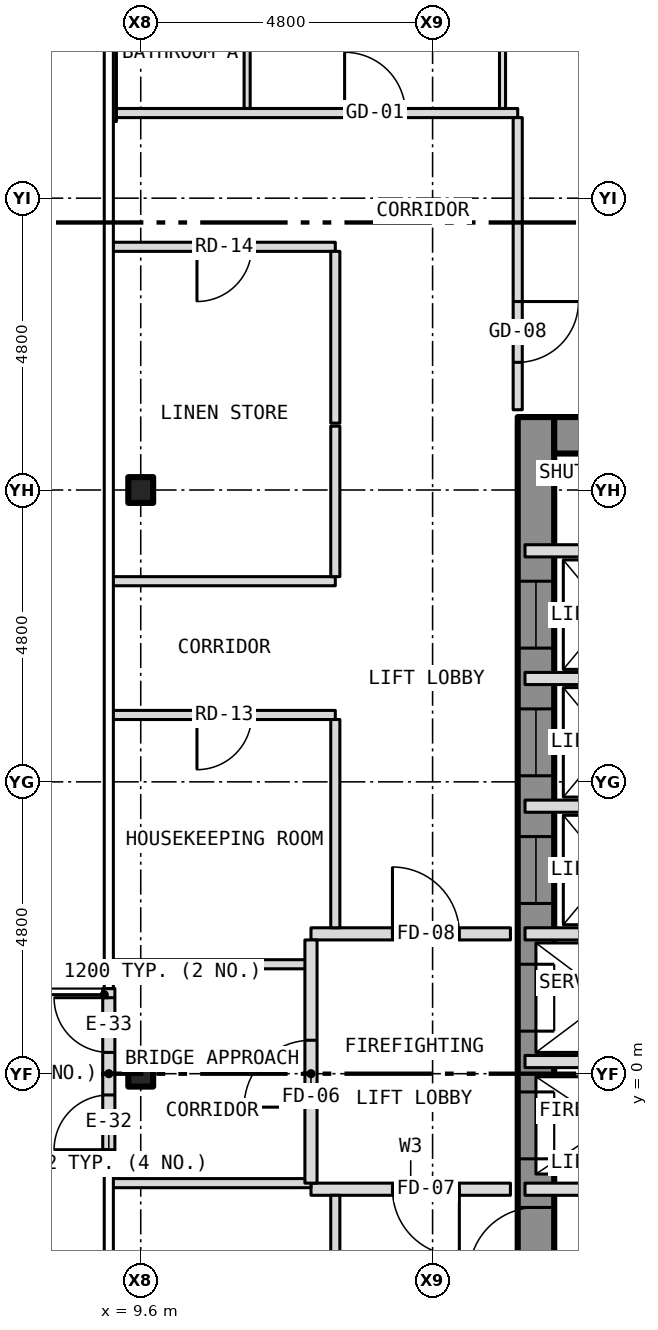
"""IFC4 building model, lengths in metres.
Left out: names, types, materials, properties, quantities, classifications, styles, units other than length and angle.
Written with IfcOpenShell. Run it as: python <this file> out.ifc"""

import sys

from ifc_helpers import new_model, si_unit, direction, frame, frame_2d, origin, origin_2d, place, context, subcontext, project, spatial, rectangle, i_section, extrude, element, fill, save


model = new_model("IFC4")
c1 = context("Model", 3, precision=1e-05, world=origin(), true_north=direction((0.0, 1.0)))
c2 = subcontext(c1, "Body", "Model", "MODEL_VIEW")
j1 = project(units=[si_unit("LENGTHUNIT", "METRE"), si_unit("PLANEANGLEUNIT", "RADIAN")], contexts=[c1])
p1 = place(None, origin())
s1 = spatial("IfcSite", under=j1, at=p1, CompositionType="ELEMENT")
p2 = place(p1, origin())
s2 = spatial("IfcBuilding", under=s1, at=p2, CompositionType="ELEMENT")
p3 = place(p2, frame((0.0, 0.0, 74.0)))
s3 = spatial("IfcBuildingStorey", under=s2, at=p3, CompositionType="ELEMENT", Elevation=74.0)
for number, where, z_axis, x_axis in (
    (1, (9.6, 0.0, -0.15), (0.0, 0.0, 1.0), (1.0, 0.0, 0.0)),
    (2, (9.6, 9.6, -0.15), (0.0, 0.0, 1.0), (1.0, 0.0, 0.0)),
):
    element("IfcColumn", number, at=place(p3, frame(where, z_axis=z_axis, x_axis=x_axis)), inside=s3, PredefinedType="COLUMN", context=c2, shape_type="SweptSolid", body=[
        extrude(i_section(OverallWidth=0.409, OverallDepth=0.424, WebThickness=0.033, FlangeThickness=0.052, at=origin_2d()), origin(), (0.0, 0.0, 1.0), 3.5),
    ])
p4 = place(p3, frame((16.1, -10.8, 0.0), z_axis=(0.0, 0.0, 1.0), x_axis=(0.0, 1.0, 0.0)))
e3 = element("IfcWall", 3, at=p4, inside=s3, PredefinedType="SHEAR", context=c2, shape_type="SweptSolid", body=[
    extrude(rectangle(XDim=21.6, YDim=0.6, at=frame_2d((10.8, 0.0))), origin(), (0.0, 0.0, 1.0), 3.25),
])
p5 = place(p4, frame((9.4, 0.0, 0.0)))
e4 = element("IfcOpeningElement", 4, at=p5, cuts=e3, PredefinedType="OPENING", context=c2, shape_type="SweptSolid", body=[
    extrude(rectangle(XDim=1.1, YDim=2.1, at=frame_2d((0.55, 1.05))), frame((0.0, 0.312, 0.0), z_axis=(0.0, -1.0, 0.0), x_axis=(1.0, 0.0, 0.0)), (0.0, 0.0, 1.0), 0.624),
])
p6 = place(p4, frame((11.5, 0.0, 0.0)))
e5 = element("IfcOpeningElement", 5, at=p6, cuts=e3, PredefinedType="OPENING", context=c2, shape_type="SweptSolid", body=[
    extrude(rectangle(XDim=1.1, YDim=2.1, at=frame_2d((0.55, 1.05))), frame((0.0, 0.312, 0.0), z_axis=(0.0, -1.0, 0.0), x_axis=(1.0, 0.0, 0.0)), (0.0, 0.0, 1.0), 0.624),
])
p7 = place(p4, frame((13.6, 0.0, 0.0)))
e6 = element("IfcOpeningElement", 6, at=p7, cuts=e3, PredefinedType="OPENING", context=c2, shape_type="SweptSolid", body=[
    extrude(rectangle(XDim=1.1, YDim=2.1, at=frame_2d((0.55, 1.05))), frame((0.0, 0.312, 0.0), z_axis=(0.0, -1.0, 0.0), x_axis=(1.0, 0.0, 0.0)), (0.0, 0.0, 1.0), 0.624),
])
p8 = place(p4, frame((15.7, 0.0, 0.0)))
e7 = element("IfcOpeningElement", 7, at=p8, cuts=e3, PredefinedType="OPENING", context=c2, shape_type="SweptSolid", body=[
    extrude(rectangle(XDim=1.1, YDim=2.1, at=frame_2d((0.55, 1.05))), frame((0.0, 0.312, 0.0), z_axis=(0.0, -1.0, 0.0), x_axis=(1.0, 0.0, 0.0)), (0.0, 0.0, 1.0), 0.624),
])
p9 = place(p4, frame((17.8, 0.0, 0.0)))
e8 = element("IfcOpeningElement", 8, at=p9, cuts=e3, PredefinedType="OPENING", context=c2, shape_type="SweptSolid", body=[
    extrude(rectangle(XDim=1.1, YDim=2.1, at=frame_2d((0.55, 1.05))), frame((0.0, 0.312, 0.0), z_axis=(0.0, -1.0, 0.0), x_axis=(1.0, 0.0, 0.0)), (0.0, 0.0, 1.0), 0.624),
])
p10 = place(p4, frame((5.642, 0.0, 0.0)))
e9 = element("IfcOpeningElement", 9, at=p10, cuts=e3, PredefinedType="OPENING", context=c2, shape_type="SweptSolid", body=[
    extrude(rectangle(XDim=1.1, YDim=2.1, at=frame_2d((0.55, 1.05))), frame((0.0, 0.312, 0.0), z_axis=(0.0, -1.0, 0.0), x_axis=(1.0, 0.0, 0.0)), (0.0, 0.0, 1.0), 0.624),
])
p11 = place(p4, frame((7.5, 0.0, 0.0)))
e10 = element("IfcOpeningElement", 10, at=p11, cuts=e3, PredefinedType="OPENING", context=c2, shape_type="SweptSolid", body=[
    extrude(rectangle(XDim=1.1, YDim=2.1, at=frame_2d((0.55, 1.05))), frame((0.0, 0.312, 0.0), z_axis=(0.0, -1.0, 0.0), x_axis=(1.0, 0.0, 0.0)), (0.0, 0.0, 1.0), 0.624),
])
p12 = place(p3, frame((16.4, 10.5, 0.0), z_axis=(0.0, 0.0, 1.0), x_axis=(1.0, 0.0, 0.0)))
e11 = element("IfcWall", 11, at=p12, inside=s3, PredefinedType="SHEAR", context=c2, shape_type="SweptSolid", body=[
    extrude(rectangle(XDim=7.0, YDim=0.6, at=frame_2d((3.5, 0.0))), origin(), (0.0, 0.0, 1.0), 3.25),
])
p13 = place(p3, frame((9.075, -1.4, 0.0), z_axis=(0.0, 0.0, 1.0), x_axis=(0.0, 1.0, 0.0)))
e12 = element("IfcWall", 12, at=p13, inside=s3, PredefinedType="SOLIDWALL", context=c2, shape_type="SweptSolid", body=[
    extrude(rectangle(XDim=2.8, YDim=0.2, at=frame_2d((1.4, 0.0))), origin(), (0.0, 0.0, 1.0), 3.5),
])
p14 = place(p13, frame((0.15, 0.0, 0.0)))
e13 = element("IfcOpeningElement", 13, at=p14, cuts=e12, PredefinedType="OPENING", context=c2, shape_type="SweptSolid", body=[
    extrude(rectangle(XDim=0.9, YDim=2.1, at=frame_2d((0.45, 1.05))), frame((0.0, 0.112, 0.0), z_axis=(0.0, -1.0, 0.0), x_axis=(1.0, 0.0, 0.0)), (0.0, 0.0, 1.0), 0.224),
])
p15 = place(p13, frame((1.75, 0.0, 0.0)))
e14 = element("IfcOpeningElement", 14, at=p15, cuts=e12, PredefinedType="OPENING", context=c2, shape_type="SweptSolid", body=[
    extrude(rectangle(XDim=0.9, YDim=2.1, at=frame_2d((0.45, 1.05))), frame((0.0, 0.112, 0.0), z_axis=(0.0, -1.0, 0.0), x_axis=(1.0, 0.0, 0.0)), (0.0, 0.0, 1.0), 0.224),
])
p16 = place(p3, frame((12.4, -1.9, 0.0), z_axis=(0.0, 0.0, 1.0), x_axis=(1.0, 0.0, 0.0)))
e15 = element("IfcWall", 15, at=p16, inside=s3, PredefinedType="PARTITIONING", context=c2, shape_type="SweptSolid", body=[
    extrude(rectangle(XDim=3.28, YDim=0.2, at=frame_2d((1.64, 0.0))), origin(), (0.0, 0.0, 1.0), 3.35),
])
p17 = place(p16, frame((1.34, 0.0, 0.0)))
e16 = element("IfcOpeningElement", 16, at=p17, cuts=e15, PredefinedType="OPENING", context=c2, shape_type="SweptSolid", body=[
    extrude(rectangle(XDim=1.1, YDim=2.1, at=frame_2d((0.55, 1.05))), frame((0.0, 0.112, 0.0), z_axis=(0.0, -1.0, 0.0), x_axis=(1.0, 0.0, 0.0)), (0.0, 0.0, 1.0), 0.224),
])
p18 = place(p3, frame((15.92, -1.9, 0.0), z_axis=(0.0, 0.0, 1.0), x_axis=(1.0, 0.0, 0.0)))
e17 = element("IfcWall", 17, at=p18, inside=s3, PredefinedType="PARTITIONING", context=c2, shape_type="SweptSolid", body=[
    extrude(rectangle(XDim=7.96, YDim=0.2, at=frame_2d((3.98, 0.0))), origin(), (0.0, 0.0, 1.0), 3.25),
])
p19 = place(p18, frame((3.74, 0.0, 0.0)))
e18 = element("IfcOpeningElement", 18, at=p19, cuts=e17, PredefinedType="OPENING", context=c2, shape_type="SweptSolid", body=[
    extrude(rectangle(XDim=0.9, YDim=2.1, at=frame_2d((0.45, 1.05))), frame((0.0, 0.112, 0.0), z_axis=(0.0, -1.0, 0.0), x_axis=(1.0, 0.0, 0.0)), (0.0, 0.0, 1.0), 0.224),
])
p20 = place(p3, frame((9.12, -1.8, 0.0), z_axis=(0.0, 0.0, 1.0), x_axis=(1.0, 0.0, 0.0)))
e19 = element("IfcWall", 19, at=p20, inside=s3, PredefinedType="PARTITIONING", context=c2, shape_type="SweptSolid", body=[
    extrude(rectangle(XDim=3.28, YDim=0.15, at=frame_2d((1.64, 0.0))), origin(), (0.0, 0.0, 1.0), 3.35),
])
p21 = place(p3, frame((15.92, 0.2, 0.0), z_axis=(0.0, 0.0, 1.0), x_axis=(1.0, 0.0, 0.0)))
e20 = element("IfcWall", 20, at=p21, inside=s3, PredefinedType="PARTITIONING", context=c2, shape_type="SweptSolid", body=[
    extrude(rectangle(XDim=2.88, YDim=0.2, at=frame_2d((1.44, 0.0))), origin(), (0.0, 0.0, 1.0), 3.25),
])
p22 = place(p3, frame((9.12, 1.8, 0.0), z_axis=(0.0, 0.0, 1.0), x_axis=(1.0, 0.0, 0.0)))
e21 = element("IfcWall", 21, at=p22, inside=s3, PredefinedType="PARTITIONING", context=c2, shape_type="SweptSolid", body=[
    extrude(rectangle(XDim=3.28, YDim=0.15, at=frame_2d((1.64, 0.0))), origin(), (0.0, 0.0, 1.0), 3.35),
])
p23 = place(p3, frame((12.4, 2.3, 0.0), z_axis=(0.0, 0.0, 1.0), x_axis=(1.0, 0.0, 0.0)))
e22 = element("IfcWall", 22, at=p23, inside=s3, PredefinedType="PARTITIONING", context=c2, shape_type="SweptSolid", body=[
    extrude(rectangle(XDim=3.28, YDim=0.2, at=frame_2d((1.64, 0.0))), origin(), (0.0, 0.0, 1.0), 3.35),
])
p24 = place(p23, frame((1.34, 0.0, 0.0)))
e23 = element("IfcOpeningElement", 23, at=p24, cuts=e22, PredefinedType="OPENING", context=c2, shape_type="SweptSolid", body=[
    extrude(rectangle(XDim=1.1, YDim=2.1, at=frame_2d((0.55, 1.05))), frame((0.0, 0.112, 0.0), z_axis=(0.0, -1.0, 0.0), x_axis=(1.0, 0.0, 0.0)), (0.0, 0.0, 1.0), 0.224),
])
for number, where, z_axis, x_axis in (
    (24, (15.92, 2.3, 0.0), (0.0, 0.0, 1.0), (1.0, 0.0, 0.0)),
    (25, (15.92, 4.4, 0.0), (0.0, 0.0, 1.0), (1.0, 0.0, 0.0)),
):
    element("IfcWall", number, at=place(p3, frame(where, z_axis=z_axis, x_axis=x_axis)), inside=s3, PredefinedType="PARTITIONING", context=c2, shape_type="SweptSolid", body=[
        extrude(rectangle(XDim=2.88, YDim=0.2, at=frame_2d((1.44, 0.0))), origin(), (0.0, 0.0, 1.0), 3.25),
    ])
p25 = place(p3, frame((9.12, 5.9, 0.0), z_axis=(0.0, 0.0, 1.0), x_axis=(1.0, 0.0, 0.0)))
e26 = element("IfcWall", 26, at=p25, inside=s3, PredefinedType="PARTITIONING", context=c2, shape_type="SweptSolid", body=[
    extrude(rectangle(XDim=3.68, YDim=0.15, at=frame_2d((1.84, 0.0))), origin(), (0.0, 0.0, 1.0), 3.35),
])
p26 = place(p25, frame((1.405, 0.0, 0.0)))
e27 = element("IfcOpeningElement", 27, at=p26, cuts=e26, PredefinedType="OPENING", context=c2, shape_type="SweptSolid", body=[
    extrude(rectangle(XDim=0.9, YDim=2.1, at=frame_2d((0.45, 1.05))), frame((0.0, 0.087, 0.0), z_axis=(0.0, -1.0, 0.0), x_axis=(1.0, 0.0, 0.0)), (0.0, 0.0, 1.0), 0.174),
])
p27 = place(p3, frame((15.92, 6.5, 0.0), z_axis=(0.0, 0.0, 1.0), x_axis=(1.0, 0.0, 0.0)))
e28 = element("IfcWall", 28, at=p27, inside=s3, PredefinedType="PARTITIONING", context=c2, shape_type="SweptSolid", body=[
    extrude(rectangle(XDim=2.88, YDim=0.2, at=frame_2d((1.44, 0.0))), origin(), (0.0, 0.0, 1.0), 3.25),
])
p28 = place(p3, frame((9.12, 8.1, 0.0), z_axis=(0.0, 0.0, 1.0), x_axis=(1.0, 0.0, 0.0)))
e29 = element("IfcWall", 29, at=p28, inside=s3, PredefinedType="PARTITIONING", context=c2, shape_type="SweptSolid", body=[
    extrude(rectangle(XDim=3.68, YDim=0.15, at=frame_2d((1.84, 0.0))), origin(), (0.0, 0.0, 1.0), 3.35),
])
p29 = place(p3, frame((15.92, 8.6, 0.0), z_axis=(0.0, 0.0, 1.0), x_axis=(1.0, 0.0, 0.0)))
e30 = element("IfcWall", 30, at=p29, inside=s3, PredefinedType="PARTITIONING", context=c2, shape_type="SweptSolid", body=[
    extrude(rectangle(XDim=2.88, YDim=0.2, at=frame_2d((1.44, 0.0))), origin(), (0.0, 0.0, 1.0), 3.25),
])
p30 = place(p3, frame((9.12, 13.6, 0.0), z_axis=(0.0, 0.0, 1.0), x_axis=(1.0, 0.0, 0.0)))
e31 = element("IfcWall", 31, at=p30, inside=s3, PredefinedType="PARTITIONING", context=c2, shape_type="SweptSolid", body=[
    extrude(rectangle(XDim=3.68, YDim=0.15, at=frame_2d((1.84, 0.0))), origin(), (0.0, 0.0, 1.0), 3.35),
])
p31 = place(p30, frame((1.405, 0.0, 0.0)))
e32 = element("IfcOpeningElement", 32, at=p31, cuts=e31, PredefinedType="OPENING", context=c2, shape_type="SweptSolid", body=[
    extrude(rectangle(XDim=0.9, YDim=2.1, at=frame_2d((0.45, 1.05))), frame((0.0, 0.087, 0.0), z_axis=(0.0, -1.0, 0.0), x_axis=(1.0, 0.0, 0.0)), (0.0, 0.0, 1.0), 0.174),
])
p32 = place(p3, frame((9.15, 15.8, 0.0), z_axis=(0.0, 0.0, 1.0), x_axis=(1.0, 0.0, 0.0)))
e33 = element("IfcWall", 33, at=p32, inside=s3, PredefinedType="PARTITIONING", context=c2, shape_type="SweptSolid", body=[
    extrude(rectangle(XDim=6.65, YDim=0.15, at=frame_2d((3.325, 0.0))), origin(), (0.0, 0.0, 1.0), 3.35),
])
p33 = place(p32, frame((3.803, 0.0, 0.0)))
e34 = element("IfcOpeningElement", 34, at=p33, cuts=e33, PredefinedType="OPENING", context=c2, shape_type="SweptSolid", body=[
    extrude(rectangle(XDim=1.0, YDim=2.1, at=frame_2d((0.5, 1.05))), frame((0.0, 0.087, 0.0), z_axis=(0.0, -1.0, 0.0), x_axis=(1.0, 0.0, 0.0)), (0.0, 0.0, 1.0), 0.174),
])
p34 = place(p3, frame((9.15, 15.66, 0.0), z_axis=(0.0, 0.0, 1.0), x_axis=(0.0, 1.0, 0.0)))
e35 = element("IfcWall", 35, at=p34, inside=s3, PredefinedType="PARTITIONING", context=c2, shape_type="SweptSolid", body=[
    extrude(rectangle(XDim=3.48, YDim=0.1, at=frame_2d((1.74, 0.0))), origin(), (0.0, 0.0, 1.0), 2.733),
])
p35 = place(p3, frame((11.35, 15.875, 0.0), z_axis=(0.0, 0.0, 1.0), x_axis=(0.0, 1.0, 0.0)))
e36 = element("IfcWall", 36, at=p35, inside=s3, PredefinedType="PARTITIONING", context=c2, shape_type="SweptSolid", body=[
    extrude(rectangle(XDim=3.075, YDim=0.1, at=frame_2d((1.538, 0.0))), origin(), (0.0, 0.0, 1.0), 3.35),
])
p36 = place(p35, frame((1.971, 0.0, 0.0)))
e37 = element("IfcOpeningElement", 37, at=p36, cuts=e36, PredefinedType="OPENING", context=c2, shape_type="SweptSolid", body=[
    extrude(rectangle(XDim=0.9, YDim=2.1, at=frame_2d((0.45, 1.05))), frame((0.0, 0.062, 0.0), z_axis=(0.0, -1.0, 0.0), x_axis=(1.0, 0.0, 0.0)), (0.0, 0.0, 1.0), 0.124),
])
p37 = place(p3, frame((12.4, -1.8, 0.0), z_axis=(0.0, 0.0, 1.0), x_axis=(0.0, 1.0, 0.0)))
e38 = element("IfcWall", 38, at=p37, inside=s3, PredefinedType="PARTITIONING", context=c2, shape_type="SweptSolid", body=[
    extrude(rectangle(XDim=4.0, YDim=0.2, at=frame_2d((2.0, 0.0))), origin(), (0.0, 0.0, 1.0), 3.35),
])
p38 = place(p37, frame((1.25, 0.0, 0.0)))
e39 = element("IfcOpeningElement", 39, at=p38, cuts=e38, PredefinedType="OPENING", context=c2, shape_type="SweptSolid", body=[
    extrude(rectangle(XDim=1.1, YDim=2.1, at=frame_2d((0.55, 1.05))), frame((0.0, 0.112, 0.0), z_axis=(0.0, -1.0, 0.0), x_axis=(1.0, 0.0, 0.0)), (0.0, 0.0, 1.0), 0.224),
])
p39 = place(p3, frame((12.8, -13.525, 0.0), z_axis=(0.0, 0.0, 1.0), x_axis=(0.0, 1.0, 0.0)))
e40 = element("IfcWall", 40, at=p39, inside=s3, PredefinedType="PARTITIONING", context=c2, shape_type="SweptSolid", body=[
    extrude(rectangle(XDim=11.525, YDim=0.15, at=frame_2d((5.762, 0.0))), origin(), (0.0, 0.0, 1.0), 3.35),
])
p40 = place(p39, frame((6.725, 0.0, 0.0)))
e41 = element("IfcOpeningElement", 41, at=p40, cuts=e40, PredefinedType="OPENING", context=c2, shape_type="SweptSolid", body=[
    extrude(rectangle(XDim=0.9, YDim=2.1, at=frame_2d((0.45, 1.05))), frame((0.0, 0.087, 0.0), z_axis=(0.0, -1.0, 0.0), x_axis=(1.0, 0.0, 0.0)), (0.0, 0.0, 1.0), 0.174),
])
p41 = place(p3, frame((12.8, 2.4, 0.0), z_axis=(0.0, 0.0, 1.0), x_axis=(0.0, 1.0, 0.0)))
e42 = element("IfcWall", 42, at=p41, inside=s3, PredefinedType="PARTITIONING", context=c2, shape_type="SweptSolid", body=[
    extrude(rectangle(XDim=3.425, YDim=0.15, at=frame_2d((1.712, 0.0))), origin(), (0.0, 0.0, 1.0), 3.35),
])
p42 = place(p3, frame((12.8, 8.175, 0.0), z_axis=(0.0, 0.0, 1.0), x_axis=(0.0, 1.0, 0.0)))
e43 = element("IfcWall", 43, at=p42, inside=s3, PredefinedType="PARTITIONING", context=c2, shape_type="SweptSolid", body=[
    extrude(rectangle(XDim=2.475, YDim=0.15, at=frame_2d((1.237, 0.0))), origin(), (0.0, 0.0, 1.0), 3.35),
])
p43 = place(p3, frame((12.8, 10.7, 0.0), z_axis=(0.0, 0.0, 1.0), x_axis=(0.0, 1.0, 0.0)))
e44 = element("IfcWall", 44, at=p43, inside=s3, PredefinedType="PARTITIONING", context=c2, shape_type="SweptSolid", body=[
    extrude(rectangle(XDim=2.825, YDim=0.15, at=frame_2d((1.413, 0.0))), origin(), (0.0, 0.0, 1.0), 3.35),
])
p44 = place(p3, frame((15.55, 15.875, 0.0), z_axis=(0.0, 0.0, 1.0), x_axis=(0.0, 1.0, 0.0)))
e45 = element("IfcWall", 45, at=p44, inside=s3, PredefinedType="PARTITIONING", context=c2, shape_type="SweptSolid", body=[
    extrude(rectangle(XDim=8.005, YDim=0.1, at=frame_2d((4.002, 0.0))), origin(), (0.0, 0.0, 1.0), 3.35),
])
p45 = place(p3, frame((15.8, 10.92, 0.0), z_axis=(0.0, 0.0, 1.0), x_axis=(0.0, 1.0, 0.0)))
e46 = element("IfcWall", 46, at=p45, inside=s3, PredefinedType="PARTITIONING", context=c2, shape_type="SweptSolid", body=[
    extrude(rectangle(XDim=4.805, YDim=0.15, at=frame_2d((2.403, 0.0))), origin(), (0.0, 0.0, 1.0), 3.35),
])
p46 = place(p45, frame((0.78, 0.0, 0.0)))
e47 = element("IfcOpeningElement", 47, at=p46, cuts=e46, PredefinedType="OPENING", context=c2, shape_type="SweptSolid", body=[
    extrude(rectangle(XDim=1.0, YDim=2.1, at=frame_2d((0.5, 1.05))), frame((0.0, 0.087, 0.0), z_axis=(0.0, -1.0, 0.0), x_axis=(1.0, 0.0, 0.0)), (0.0, 0.0, 1.0), 0.174),
])
p47 = place(p14, origin())
e48 = element("IfcDoor", 48, at=p47, inside=s3, OperationType="SINGLE_SWING_LEFT", PredefinedType="DOOR", context=c2, shape_type="SweptSolid", body=[
    extrude(rectangle(XDim=0.9, YDim=2.1, at=frame_2d((0.45, 1.05))), frame((0.0, 0.025, 0.0), z_axis=(0.0, -1.0, 0.0), x_axis=(1.0, 0.0, 0.0)), (0.0, 0.0, 1.0), 0.05),
])
fill(e13, e48)
p48 = place(p15, origin())
e49 = element("IfcDoor", 49, at=p48, inside=s3, OperationType="SINGLE_SWING_RIGHT", PredefinedType="DOOR", context=c2, shape_type="SweptSolid", body=[
    extrude(rectangle(XDim=0.9, YDim=2.1, at=frame_2d((0.45, 1.05))), frame((0.0, 0.025, 0.0), z_axis=(0.0, -1.0, 0.0), x_axis=(1.0, 0.0, 0.0)), (0.0, 0.0, 1.0), 0.05),
])
fill(e14, e49)
p49 = place(p5, origin())
e50 = element("IfcDoor", 50, at=p49, inside=s3, OperationType="SLIDING_TO_LEFT", PredefinedType="DOOR", context=c2, shape_type="SweptSolid", body=[
    extrude(rectangle(XDim=1.1, YDim=2.1, at=frame_2d((0.55, 1.05))), frame((0.0, 0.025, 0.0), z_axis=(0.0, -1.0, 0.0), x_axis=(1.0, 0.0, 0.0)), (0.0, 0.0, 1.0), 0.05),
])
fill(e4, e50)
p50 = place(p6, origin())
e51 = element("IfcDoor", 51, at=p50, inside=s3, OperationType="SLIDING_TO_LEFT", PredefinedType="DOOR", context=c2, shape_type="SweptSolid", body=[
    extrude(rectangle(XDim=1.1, YDim=2.1, at=frame_2d((0.55, 1.05))), frame((0.0, 0.025, 0.0), z_axis=(0.0, -1.0, 0.0), x_axis=(1.0, 0.0, 0.0)), (0.0, 0.0, 1.0), 0.05),
])
fill(e5, e51)
p51 = place(p7, origin())
e52 = element("IfcDoor", 52, at=p51, inside=s3, OperationType="SLIDING_TO_LEFT", PredefinedType="DOOR", context=c2, shape_type="SweptSolid", body=[
    extrude(rectangle(XDim=1.1, YDim=2.1, at=frame_2d((0.55, 1.05))), frame((0.0, 0.025, 0.0), z_axis=(0.0, -1.0, 0.0), x_axis=(1.0, 0.0, 0.0)), (0.0, 0.0, 1.0), 0.05),
])
fill(e6, e52)
p52 = place(p8, origin())
e53 = element("IfcDoor", 53, at=p52, inside=s3, OperationType="SLIDING_TO_LEFT", PredefinedType="DOOR", context=c2, shape_type="SweptSolid", body=[
    extrude(rectangle(XDim=1.1, YDim=2.1, at=frame_2d((0.55, 1.05))), frame((0.0, 0.025, 0.0), z_axis=(0.0, -1.0, 0.0), x_axis=(1.0, 0.0, 0.0)), (0.0, 0.0, 1.0), 0.05),
])
fill(e7, e53)
p53 = place(p9, origin())
e54 = element("IfcDoor", 54, at=p53, inside=s3, OperationType="SLIDING_TO_LEFT", PredefinedType="DOOR", context=c2, shape_type="SweptSolid", body=[
    extrude(rectangle(XDim=1.1, YDim=2.1, at=frame_2d((0.55, 1.05))), frame((0.0, 0.025, 0.0), z_axis=(0.0, -1.0, 0.0), x_axis=(1.0, 0.0, 0.0)), (0.0, 0.0, 1.0), 0.05),
])
fill(e8, e54)
p54 = place(p11, origin())
e55 = element("IfcDoor", 55, at=p54, inside=s3, OperationType="SINGLE_SWING_LEFT", PredefinedType="DOOR", context=c2, shape_type="SweptSolid", body=[
    extrude(rectangle(XDim=1.1, YDim=2.1, at=frame_2d((0.55, 1.05))), frame((0.0, 0.025, 0.0), z_axis=(0.0, -1.0, 0.0), x_axis=(1.0, 0.0, 0.0)), (0.0, 0.0, 1.0), 0.05),
])
fill(e10, e55)
p55 = place(p38, origin())
e56 = element("IfcDoor", 56, at=p55, inside=s3, OperationType="SINGLE_SWING_LEFT", PredefinedType="DOOR", context=c2, shape_type="SweptSolid", body=[
    extrude(rectangle(XDim=1.1, YDim=2.1, at=frame_2d((0.55, 1.05))), frame((0.0, 0.025, 0.0), z_axis=(0.0, -1.0, 0.0), x_axis=(1.0, 0.0, 0.0)), (0.0, 0.0, 1.0), 0.05),
])
fill(e39, e56)
p56 = place(p17, origin())
e57 = element("IfcDoor", 57, at=p56, inside=s3, OperationType="SINGLE_SWING_RIGHT", PredefinedType="DOOR", context=c2, shape_type="SweptSolid", body=[
    extrude(rectangle(XDim=1.1, YDim=2.1, at=frame_2d((0.55, 1.05))), frame((0.0, 0.025, 0.0), z_axis=(0.0, -1.0, 0.0), x_axis=(1.0, 0.0, 0.0)), (0.0, 0.0, 1.0), 0.05),
])
fill(e16, e57)
p57 = place(p24, origin())
e58 = element("IfcDoor", 58, at=p57, inside=s3, OperationType="SINGLE_SWING_LEFT", PredefinedType="DOOR", context=c2, shape_type="SweptSolid", body=[
    extrude(rectangle(XDim=1.1, YDim=2.1, at=frame_2d((0.55, 1.05))), frame((0.0, 0.025, 0.0), z_axis=(0.0, -1.0, 0.0), x_axis=(1.0, 0.0, 0.0)), (0.0, 0.0, 1.0), 0.05),
])
fill(e23, e58)
p58 = place(p33, origin())
e59 = element("IfcDoor", 59, at=p58, inside=s3, OperationType="SINGLE_SWING_LEFT", PredefinedType="DOOR", context=c2, shape_type="SweptSolid", body=[
    extrude(rectangle(XDim=1.0, YDim=2.1, at=frame_2d((0.5, 1.05))), frame((0.0, 0.025, 0.0), z_axis=(0.0, -1.0, 0.0), x_axis=(1.0, 0.0, 0.0)), (0.0, 0.0, 1.0), 0.05),
])
fill(e34, e59)
p59 = place(p46, origin())
e60 = element("IfcDoor", 60, at=p59, inside=s3, OperationType="SINGLE_SWING_RIGHT", PredefinedType="DOOR", context=c2, shape_type="SweptSolid", body=[
    extrude(rectangle(XDim=1.0, YDim=2.1, at=frame_2d((0.5, 1.05))), frame((0.0, 0.025, 0.0), z_axis=(0.0, -1.0, 0.0), x_axis=(1.0, 0.0, 0.0)), (0.0, 0.0, 1.0), 0.05),
])
fill(e47, e60)
p60 = place(p26, origin())
e61 = element("IfcDoor", 61, at=p60, inside=s3, OperationType="SINGLE_SWING_LEFT", PredefinedType="DOOR", context=c2, shape_type="SweptSolid", body=[
    extrude(rectangle(XDim=0.9, YDim=2.1, at=frame_2d((0.45, 1.05))), frame((0.0, 0.025, 0.0), z_axis=(0.0, -1.0, 0.0), x_axis=(1.0, 0.0, 0.0)), (0.0, 0.0, 1.0), 0.05),
])
fill(e27, e61)
p61 = place(p31, origin())
e62 = element("IfcDoor", 62, at=p61, inside=s3, OperationType="SINGLE_SWING_LEFT", PredefinedType="DOOR", context=c2, shape_type="SweptSolid", body=[
    extrude(rectangle(XDim=0.9, YDim=2.1, at=frame_2d((0.45, 1.05))), frame((0.0, 0.025, 0.0), z_axis=(0.0, -1.0, 0.0), x_axis=(1.0, 0.0, 0.0)), (0.0, 0.0, 1.0), 0.05),
])
fill(e32, e62)
save(model, sys.argv[1])
